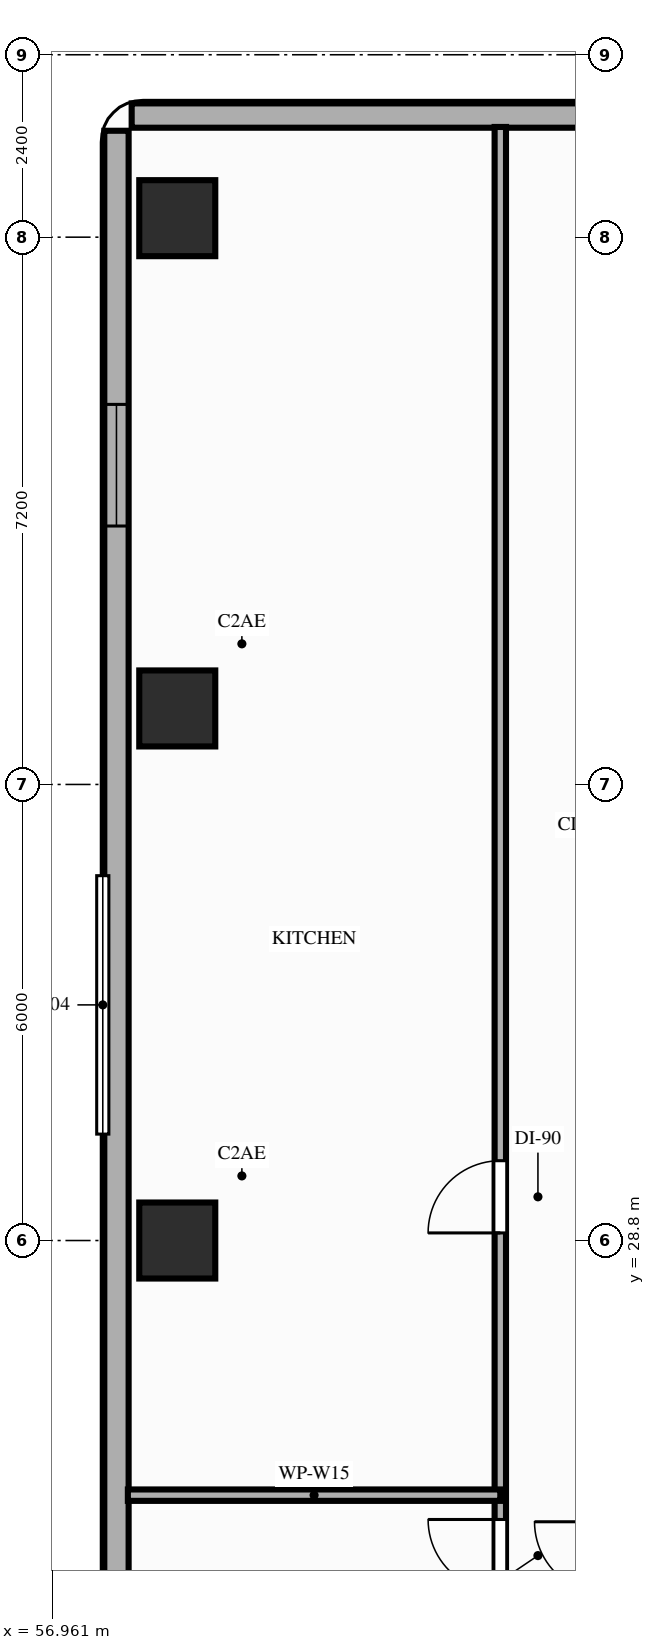
"""IFC4 building model, lengths in metres.
Left out: names, types, materials, properties, quantities, classifications, styles, units other than length and angle.
Written with IfcOpenShell. Run it as: python <this file> out.ifc"""

import sys

from ifc_helpers import new_model, si_unit, direction, frame, frame_2d, origin, origin_2d, place, context, subcontext, project, spatial, rectangle, extrude, element, fill, save


model = new_model("IFC4")
c1 = context("Model", 3, precision=1e-05, world=origin(), true_north=direction((0.0, 1.0)))
c2 = subcontext(c1, "Body", "Model", "MODEL_VIEW")
j1 = project(units=[si_unit("LENGTHUNIT", "METRE"), si_unit("PLANEANGLEUNIT", "RADIAN")], contexts=[c1])
p1 = place(None, origin())
s1 = spatial("IfcSite", under=j1, at=p1, CompositionType="ELEMENT")
p2 = place(p1, origin())
s2 = spatial("IfcBuilding", under=s1, at=p2, CompositionType="ELEMENT")
p3 = place(p2, frame((0.0, 0.0, 39.8)))
s3 = spatial("IfcBuildingStorey", under=s2, at=p3, CompositionType="ELEMENT", Elevation=39.8)
for number, where, z_axis, x_axis in (
    (1, (58.6, 28.8, 0.0), (0.0, 0.0, 1.0), (1.0, 0.0, 0.0)),
    (2, (58.6, 35.8, 0.0), (0.0, 0.0, 1.0), (1.0, 0.0, 0.0)),
    (3, (58.6, 42.25, 0.0), (0.0, 0.0, 1.0), (1.0, 0.0, 0.0)),
):
    element("IfcColumn", number, at=place(p3, frame(where, z_axis=z_axis, x_axis=x_axis)), inside=s3, PredefinedType="COLUMN", context=c2, shape_type="SweptSolid", body=[
        extrude(rectangle(XDim=1.0, YDim=1.0, at=origin_2d()), origin(), (0.0, 0.0, 1.0), 3.8),
    ])
p4 = place(p3, frame((57.8, 43.4, 0.0), z_axis=(0.0, 0.0, 1.0), x_axis=(0.0, -1.0, 0.0)))
e4 = element("IfcWall", 4, at=p4, inside=s3, PredefinedType="STANDARD", context=c2, shape_type="SweptSolid", body=[
    extrude(rectangle(XDim=22.6, YDim=0.32, at=frame_2d((11.3, 0.0))), origin(), (0.0, 0.0, 1.0), 3.11),
])
p5 = place(p4, frame((3.6, 0.0, 0.85)))
e5 = element("IfcOpeningElement", 5, at=p5, cuts=e4, PredefinedType="OPENING", context=c2, shape_type="SweptSolid", body=[
    extrude(rectangle(XDim=1.6, YDim=1.7, at=frame_2d((0.8, 0.85))), frame((0.0, 0.17, 0.0), z_axis=(0.0, -1.0, 0.0), x_axis=(1.0, 0.0, 0.0)), (0.0, 0.0, 1.0), 0.34),
])
p6 = place(p3, frame((72.8, 43.6, 0.0), z_axis=(0.0, 0.0, 1.0), x_axis=(-1.0, 0.0, 0.0)))
e6 = element("IfcWall", 6, at=p6, inside=s3, PredefinedType="STANDARD", context=c2, shape_type="SweptSolid", body=[
    extrude(rectangle(XDim=14.8, YDim=0.32, at=frame_2d((7.4, 0.0))), origin(), (0.0, 0.0, 1.0), 3.62),
])
p7 = place(p3, frame((62.85, 20.75, 0.0), z_axis=(0.0, 0.0, 1.0), x_axis=(0.0, 1.0, 0.0)))
e7 = element("IfcWall", 7, at=p7, inside=s3, PredefinedType="PARTITIONING", context=c2, shape_type="SweptSolid", body=[
    extrude(rectangle(XDim=22.7, YDim=0.15, at=frame_2d((11.35, 0.0))), origin(), (0.0, 0.0, 1.0), 3.11),
])
p8 = place(p7, frame((0.73, 0.0, 0.0)))
e8 = element("IfcOpeningElement", 8, at=p8, cuts=e7, PredefinedType="OPENING", context=c2, shape_type="SweptSolid", body=[
    extrude(rectangle(XDim=0.85, YDim=2.1, at=frame_2d((0.425, 1.05))), frame((0.0, 0.085, 0.0), z_axis=(0.0, -1.0, 0.0), x_axis=(1.0, 0.0, 0.0)), (0.0, 0.0, 1.0), 0.17),
])
p9 = place(p7, frame((3.43, 0.0, 0.0)))
e9 = element("IfcOpeningElement", 9, at=p9, cuts=e7, PredefinedType="OPENING", context=c2, shape_type="SweptSolid", body=[
    extrude(rectangle(XDim=0.95, YDim=2.1, at=frame_2d((0.475, 1.05))), frame((0.0, 0.085, 0.0), z_axis=(0.0, -1.0, 0.0), x_axis=(1.0, 0.0, 0.0)), (0.0, 0.0, 1.0), 0.17),
])
p10 = place(p7, frame((8.15, 0.0, 0.0)))
e10 = element("IfcOpeningElement", 10, at=p10, cuts=e7, PredefinedType="OPENING", context=c2, shape_type="SweptSolid", body=[
    extrude(rectangle(XDim=0.95, YDim=2.15, at=frame_2d((0.475, 1.075))), frame((0.0, 0.085, 0.0), z_axis=(0.0, -1.0, 0.0), x_axis=(1.0, 0.0, 0.0)), (0.0, 0.0, 1.0), 0.17),
])
p11 = place(p3, frame((57.95, 25.45, 0.0), z_axis=(0.0, 0.0, 1.0), x_axis=(1.0, 0.0, 0.0)))
e11 = element("IfcWall", 11, at=p11, inside=s3, PredefinedType="PARTITIONING", context=c2, shape_type="SweptSolid", body=[
    extrude(rectangle(XDim=4.9, YDim=0.15, at=frame_2d((2.45, 0.0))), origin(), (0.0, 0.0, 1.0), 3.11),
])
p12 = place(p5, origin())
e12 = element("IfcWindow", 12, at=p12, inside=s3, PartitioningType="SINGLE_PANEL", PredefinedType="WINDOW", context=c2, shape_type="SweptSolid", body=[
    extrude(rectangle(XDim=1.6, YDim=1.7, at=frame_2d((0.8, 0.85))), frame((0.0, 0.03, 0.0), z_axis=(0.0, -1.0, 0.0), x_axis=(1.0, 0.0, 0.0)), (0.0, 0.0, 1.0), 0.06),
])
fill(e5, e12)
p13 = place(p9, origin())
e13 = element("IfcDoor", 13, at=p13, inside=s3, OperationType="SINGLE_SWING_RIGHT", PredefinedType="DOOR", context=c2, shape_type="SweptSolid", body=[
    extrude(rectangle(XDim=0.95, YDim=2.1, at=frame_2d((0.475, 1.05))), frame((0.0, 0.025, 0.0), z_axis=(0.0, -1.0, 0.0), x_axis=(1.0, 0.0, 0.0)), (0.0, 0.0, 1.0), 0.05),
])
fill(e9, e13)
p14 = place(p10, origin())
e14 = element("IfcDoor", 14, at=p14, inside=s3, OperationType="SINGLE_SWING_LEFT", PredefinedType="DOOR", context=c2, shape_type="SweptSolid", body=[
    extrude(rectangle(XDim=0.95, YDim=2.15, at=frame_2d((0.475, 1.075))), frame((0.0, 0.025, 0.0), z_axis=(0.0, -1.0, 0.0), x_axis=(1.0, 0.0, 0.0)), (0.0, 0.0, 1.0), 0.05),
])
fill(e10, e14)
save(model, sys.argv[1])
